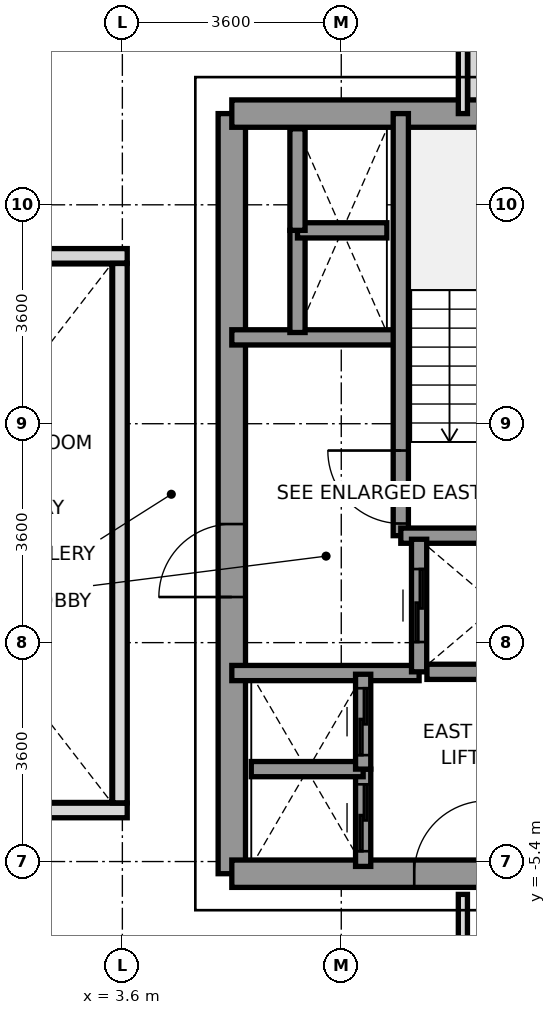
"""IFC4 building model, lengths in metres.
Left out: names, types, materials, properties, quantities, classifications, styles, units other than length and angle.
Written with IfcOpenShell. Run it as: python <this file> out.ifc"""

import sys

from ifc_helpers import new_model, si_unit, direction, frame, frame_2d, origin, place, context, subcontext, project, spatial, rectangle, extrude, source, transform, mapped, element, fill, save


model = new_model("IFC4")
c1 = context("Model", 3, precision=1e-05, world=origin(), true_north=direction((0.0, 1.0)))
c2 = subcontext(c1, "Body", "Model", "MODEL_VIEW")
j1 = project(units=[si_unit("LENGTHUNIT", "METRE"), si_unit("PLANEANGLEUNIT", "RADIAN")], contexts=[c1])
p1 = place(None, origin())
s1 = spatial("IfcSite", under=j1, at=p1, CompositionType="ELEMENT")
p2 = place(p1, origin())
s2 = spatial("IfcBuilding", under=s1, at=p2, CompositionType="ELEMENT")
p3 = place(p2, frame((0.0, 0.0, 110.8)))
s3 = spatial("IfcBuildingStorey", under=s2, at=p3, CompositionType="ELEMENT", Elevation=110.8)
p4 = place(p3, frame((9.4, 8.472, 0.0), z_axis=(0.0, 0.0, 1.0), x_axis=(0.0, -1.0, 0.0)))
e1 = element("IfcWall", 1, at=p4, inside=s3, PredefinedType="PARAPET", context=c2, shape_type="SweptSolid", body=[
    extrude(rectangle(XDim=1.519, YDim=0.24, at=frame_2d((0.76, 0.0))), origin(), (0.0, 0.0, 1.0), 1.15),
])
p5 = place(p3, frame((5.4, -5.6, 0.0), z_axis=(0.0, 0.0, 1.0), x_axis=(0.0, 1.0, 0.0)))
e2 = element("IfcWall", 2, at=p5, inside=s3, PredefinedType="SHEAR", context=c2, shape_type="SweptSolid", body=[
    extrude(rectangle(XDim=12.5, YDim=0.45, at=frame_2d((6.25, 0.0))), origin(), (0.0, 0.0, 1.0), 3.2),
])
p6 = place(p5, frame((4.55, 0.0, 0.0)))
e3 = element("IfcOpeningElement", 3, at=p6, cuts=e2, PredefinedType="OPENING", context=c2, shape_type="SweptSolid", body=[
    extrude(rectangle(XDim=1.2, YDim=2.2, at=frame_2d((0.6, 1.1))), frame((0.0, 0.235, 0.0), z_axis=(0.0, -1.0, 0.0), x_axis=(1.0, 0.0, 0.0)), (0.0, 0.0, 1.0), 0.47),
])
p7 = place(p3, frame((5.4, 6.9, 0.0), z_axis=(0.0, 0.0, 1.0), x_axis=(1.0, 0.0, 0.0)))
e4 = element("IfcWall", 4, at=p7, inside=s3, PredefinedType="SHEAR", context=c2, shape_type="SweptSolid", body=[
    extrude(rectangle(XDim=5.981, YDim=0.45, at=frame_2d((2.991, 0.0))), origin(), (0.0, 0.0, 1.0), 3.2),
])
p8 = place(p3, frame((5.4, -5.6, 0.0), z_axis=(0.0, 0.0, 1.0), x_axis=(1.0, 0.0, 0.0)))
e5 = element("IfcWall", 5, at=p8, inside=s3, PredefinedType="SHEAR", context=c2, shape_type="SweptSolid", body=[
    extrude(rectangle(XDim=7.8, YDim=0.45, at=frame_2d((3.9, 0.0))), origin(), (0.0, 0.0, 1.0), 3.2),
])
p9 = place(p8, frame((3.0, 0.0, 0.0)))
e6 = element("IfcOpeningElement", 6, at=p9, cuts=e5, PredefinedType="OPENING", context=c2, shape_type="SweptSolid", body=[
    extrude(rectangle(XDim=1.2, YDim=2.2, at=frame_2d((0.6, 1.1))), frame((0.0, 0.235, 0.0), z_axis=(0.0, -1.0, 0.0), x_axis=(1.0, 0.0, 0.0)), (0.0, 0.0, 1.0), 0.47),
])
p10 = place(p8, frame((5.85, 0.0, 0.0)))
e7 = element("IfcOpeningElement", 7, at=p10, cuts=e5, PredefinedType="OPENING", context=c2, shape_type="SweptSolid", body=[
    extrude(rectangle(XDim=0.8, YDim=2.1, at=frame_2d((0.4, 1.05))), frame((0.0, 0.235, 0.0), z_axis=(0.0, -1.0, 0.0), x_axis=(1.0, 0.0, 0.0)), (0.0, 0.0, 1.0), 0.47),
])
p11 = place(p3, frame((5.4, 3.22, 0.0), z_axis=(0.0, 0.0, 1.0), x_axis=(1.0, 0.0, 0.0)))
e8 = element("IfcWall", 8, at=p11, inside=s3, PredefinedType="SOLIDWALL", context=c2, shape_type="SweptSolid", body=[
    extrude(rectangle(XDim=2.78, YDim=0.25, at=frame_2d((1.39, 0.0))), origin(), (0.0, 0.0, 1.0), 3.2),
])
p12 = place(p3, frame((5.4, -2.3, 0.0), z_axis=(0.0, 0.0, 1.0), x_axis=(1.0, 0.0, 0.0)))
e9 = element("IfcWall", 9, at=p12, inside=s3, PredefinedType="SOLIDWALL", context=c2, shape_type="SweptSolid", body=[
    extrude(rectangle(XDim=3.08, YDim=0.25, at=frame_2d((1.54, 0.0))), origin(), (0.0, 0.0, 1.0), 3.2),
])
p13 = place(p3, frame((8.179, -0.041, 0.0), z_axis=(0.0, 0.0, 1.0), x_axis=(0.0, 1.0, 0.0)))
e10 = element("IfcWall", 10, at=p13, inside=s3, PredefinedType="SOLIDWALL", context=c2, shape_type="SweptSolid", body=[
    extrude(rectangle(XDim=6.941, YDim=0.25, at=frame_2d((3.47, 0.0))), origin(), (0.0, 0.0, 1.0), 3.2),
])
p14 = place(p13, frame((0.2, 0.0, 0.0)))
e11 = element("IfcOpeningElement", 11, at=p14, cuts=e10, PredefinedType="OPENING", context=c2, shape_type="SweptSolid", body=[
    extrude(rectangle(XDim=1.2, YDim=2.2, at=frame_2d((0.6, 1.1))), frame((0.0, 0.135, 0.0), z_axis=(0.0, -1.0, 0.0), x_axis=(1.0, 0.0, 0.0)), (0.0, 0.0, 1.0), 0.27),
])
p15 = place(p3, frame((8.179, -0.041, 0.0), z_axis=(0.0, 0.0, 1.0), x_axis=(1.0, 0.0, 0.0)))
e12 = element("IfcWall", 12, at=p15, inside=s3, PredefinedType="SOLIDWALL", context=c2, shape_type="SweptSolid", body=[
    extrude(rectangle(XDim=3.202, YDim=0.25, at=frame_2d((1.601, 0.0))), origin(), (0.0, 0.0, 1.0), 3.2),
])
p16 = place(p3, frame((8.48, -2.28, 0.0), z_axis=(0.0, 0.0, 1.0), x_axis=(0.0, 1.0, 0.0)))
e13 = element("IfcWall", 13, at=p16, inside=s3, PredefinedType="SOLIDWALL", context=c2, shape_type="SweptSolid", body=[
    extrude(rectangle(XDim=2.18, YDim=0.25, at=frame_2d((1.09, 0.0))), origin(), (0.0, 0.0, 1.0), 3.2),
])
p17 = place(p16, frame((0.49, 0.0, 0.0)))
e14 = element("IfcOpeningElement", 14, at=p17, cuts=e13, PredefinedType="OPENING", context=c2, shape_type="SweptSolid", body=[
    extrude(rectangle(XDim=1.2, YDim=2.2, at=frame_2d((0.6, 1.1))), frame((0.0, 0.135, 0.0), z_axis=(0.0, -1.0, 0.0), x_axis=(1.0, 0.0, 0.0)), (0.0, 0.0, 1.0), 0.27),
])
p18 = place(p3, frame((8.609, -2.28, 0.0), z_axis=(0.0, 0.0, 1.0), x_axis=(1.0, 0.0, 0.0)))
e15 = element("IfcWall", 15, at=p18, inside=s3, PredefinedType="SOLIDWALL", context=c2, shape_type="SweptSolid", body=[
    extrude(rectangle(XDim=2.312, YDim=0.25, at=frame_2d((1.156, 0.0))), origin(), (0.0, 0.0, 1.0), 3.2),
])
p19 = place(p3, frame((7.56, -5.48, 0.0), z_axis=(0.0, 0.0, 1.0), x_axis=(0.0, 1.0, 0.0)))
e16 = element("IfcWall", 16, at=p19, inside=s3, PredefinedType="SOLIDWALL", context=c2, shape_type="SweptSolid", body=[
    extrude(rectangle(XDim=1.6, YDim=0.25, at=frame_2d((0.8, 0.0))), origin(), (0.0, 0.0, 1.0), 3.2),
])
p20 = place(p19, frame((0.25, 0.0, 0.0)))
e17 = element("IfcOpeningElement", 17, at=p20, cuts=e16, PredefinedType="OPENING", context=c2, shape_type="SweptSolid", body=[
    extrude(rectangle(XDim=1.1, YDim=2.2, at=frame_2d((0.55, 1.1))), frame((0.0, 0.135, 0.0), z_axis=(0.0, -1.0, 0.0), x_axis=(1.0, 0.0, 0.0)), (0.0, 0.0, 1.0), 0.27),
])
p21 = place(p3, frame((5.72, -3.88, 0.0), z_axis=(0.0, 0.0, 1.0), x_axis=(1.0, 0.0, 0.0)))
e18 = element("IfcWall", 18, at=p21, inside=s3, PredefinedType="SOLIDWALL", context=c2, shape_type="SweptSolid", body=[
    extrude(rectangle(XDim=1.84, YDim=0.25, at=frame_2d((0.92, 0.0))), origin(), (0.0, 0.0, 1.0), 3.2),
])
p22 = place(p3, frame((7.56, -3.88, 0.0), z_axis=(0.0, 0.0, 1.0), x_axis=(0.0, 1.0, 0.0)))
e19 = element("IfcWall", 19, at=p22, inside=s3, PredefinedType="SOLIDWALL", context=c2, shape_type="SweptSolid", body=[
    extrude(rectangle(XDim=1.56, YDim=0.25, at=frame_2d((0.78, 0.0))), origin(), (0.0, 0.0, 1.0), 3.2),
])
p23 = place(p22, frame((0.23, 0.0, 0.0)))
e20 = element("IfcOpeningElement", 20, at=p23, cuts=e19, PredefinedType="OPENING", context=c2, shape_type="SweptSolid", body=[
    extrude(rectangle(XDim=1.1, YDim=2.2, at=frame_2d((0.55, 1.1))), frame((0.0, 0.135, 0.0), z_axis=(0.0, -1.0, 0.0), x_axis=(1.0, 0.0, 0.0)), (0.0, 0.0, 1.0), 0.27),
])
p24 = place(p3, frame((6.48, 3.3, 0.0), z_axis=(0.0, 0.0, 1.0), x_axis=(0.0, 1.0, 0.0)))
e21 = element("IfcWall", 21, at=p24, inside=s3, PredefinedType="SOLIDWALL", context=c2, shape_type="SweptSolid", body=[
    extrude(rectangle(XDim=1.68, YDim=0.25, at=frame_2d((0.84, 0.0))), origin(), (0.0, 0.0, 1.0), 3.2),
])
p25 = place(p3, frame((6.48, 4.98, 0.0), z_axis=(0.0, 0.0, 1.0), x_axis=(1.0, 0.0, 0.0)))
e22 = element("IfcWall", 22, at=p25, inside=s3, PredefinedType="SOLIDWALL", context=c2, shape_type="SweptSolid", body=[
    extrude(rectangle(XDim=1.47, YDim=0.25, at=frame_2d((0.735, 0.0))), origin(), (0.0, 0.0, 1.0), 3.2),
])
p26 = place(p3, frame((6.48, 4.98, 0.0), z_axis=(0.0, 0.0, 1.0), x_axis=(0.0, 1.0, 0.0)))
e23 = element("IfcWall", 23, at=p26, inside=s3, PredefinedType="SOLIDWALL", context=c2, shape_type="SweptSolid", body=[
    extrude(rectangle(XDim=1.67, YDim=0.25, at=frame_2d((0.835, 0.0))), origin(), (0.0, 0.0, 1.0), 3.2),
])
p27 = place(p3, frame((9.2, 6.9, 0.0), z_axis=(0.0, 0.0, 1.0), x_axis=(0.0, 1.0, 0.0)))
e24 = element("IfcWall", 24, at=p27, inside=s3, PredefinedType="PARTITIONING", context=c2, shape_type="SweptSolid", body=[
    extrude(rectangle(XDim=8.78, YDim=0.15, at=frame_2d((4.39, 0.0))), origin(), (0.0, 0.0, 1.0), 2.7),
])
p28 = place(p3, frame((9.2, -15.68, 0.0), z_axis=(0.0, 0.0, 1.0), x_axis=(0.0, 1.0, 0.0)))
e25 = element("IfcWall", 25, at=p28, inside=s3, PredefinedType="PARTITIONING", context=c2, shape_type="SweptSolid", body=[
    extrude(rectangle(XDim=9.74, YDim=0.15, at=frame_2d((4.87, 0.0))), origin(), (0.0, 0.0, 1.0), 2.7),
])
for number, where, z_axis, x_axis in (
    (26, (-3.68, -4.56, 0.0), (0.0, 0.0, 1.0), (1.0, 0.0, 0.0)),
    (27, (-3.68, 4.56, 0.0), (0.0, 0.0, 1.0), (1.0, 0.0, 0.0)),
):
    element("IfcWall", number, at=place(p3, frame(where, z_axis=z_axis, x_axis=x_axis)), inside=s3, PredefinedType="PARAPET", context=c2, shape_type="SweptSolid", body=[
        extrude(rectangle(XDim=7.36, YDim=0.24, at=frame_2d((3.68, 0.0))), origin(), (0.0, 0.0, 1.0), 1.15),
    ])
p29 = place(p3, frame((3.56, -4.435, 0.0), z_axis=(0.0, 0.0, 1.0), x_axis=(0.0, 1.0, 0.0)))
e28 = element("IfcWall", 28, at=p29, inside=s3, PredefinedType="PARAPET", context=c2, shape_type="SweptSolid", body=[
    extrude(rectangle(XDim=8.87, YDim=0.24, at=frame_2d((4.435, 0.0))), origin(), (0.0, 0.0, 1.0), 1.15),
])
m1 = source(origin(), c2, "Body", "SweptSolid", [
    extrude(rectangle(XDim=1.2, YDim=2.2, at=frame_2d((0.6, 1.1))), frame((0.0, 0.025, 0.0), z_axis=(0.0, -1.0, 0.0), x_axis=(1.0, 0.0, 0.0)), (0.0, 0.0, 1.0), 0.05),
])
p30 = place(p14, origin())
e29 = element("IfcDoor", 29, at=p30, inside=s3, OperationType="SINGLE_SWING_RIGHT", PredefinedType="DOOR", context=c2, shape_type="MappedRepresentation", body=[
    mapped(m1, transform((0.0, 0.0, 0.0), x_axis=(1.0, 0.0, 0.0), y_axis=(0.0, 1.0, 0.0), z_axis=(0.0, 0.0, 1.0), scale=1.0)),
])
fill(e11, e29)
p31 = place(p6, origin())
e30 = element("IfcDoor", 30, at=p31, inside=s3, OperationType="SINGLE_SWING_LEFT", PredefinedType="DOOR", context=c2, shape_type="MappedRepresentation", body=[
    mapped(m1, transform((0.0, 0.0, 0.0), x_axis=(1.0, 0.0, 0.0), y_axis=(0.0, 1.0, 0.0), z_axis=(0.0, 0.0, 1.0), scale=1.0)),
])
fill(e3, e30)
p32 = place(p9, origin())
e31 = element("IfcDoor", 31, at=p32, inside=s3, OperationType="SINGLE_SWING_RIGHT", PredefinedType="DOOR", context=c2, shape_type="MappedRepresentation", body=[
    mapped(m1, transform((0.0, 0.0, 0.0), x_axis=(1.0, 0.0, 0.0), y_axis=(0.0, 1.0, 0.0), z_axis=(0.0, 0.0, 1.0), scale=1.0)),
])
fill(e6, e31)
p33 = place(p17, origin())
e32 = element("IfcDoor", 32, at=p33, inside=s3, OperationType="SLIDING_TO_RIGHT", PredefinedType="DOOR", context=c2, shape_type="MappedRepresentation", body=[
    mapped(m1, transform((0.0, 0.0, 0.0), x_axis=(1.0, 0.0, 0.0), y_axis=(0.0, 1.0, 0.0), z_axis=(0.0, 0.0, 1.0), scale=1.0)),
])
fill(e14, e32)
m2 = source(origin(), c2, "Body", "SweptSolid", [
    extrude(rectangle(XDim=1.1, YDim=2.2, at=frame_2d((0.55, 1.1))), frame((0.0, 0.025, 0.0), z_axis=(0.0, -1.0, 0.0), x_axis=(1.0, 0.0, 0.0)), (0.0, 0.0, 1.0), 0.05),
])
p34 = place(p20, origin())
e33 = element("IfcDoor", 33, at=p34, inside=s3, OperationType="SLIDING_TO_LEFT", PredefinedType="DOOR", context=c2, shape_type="MappedRepresentation", body=[
    mapped(m2, transform((0.0, 0.0, 0.0), x_axis=(1.0, 0.0, 0.0), y_axis=(0.0, 1.0, 0.0), z_axis=(0.0, 0.0, 1.0), scale=1.0)),
])
fill(e17, e33)
p35 = place(p23, origin())
e34 = element("IfcDoor", 34, at=p35, inside=s3, OperationType="SLIDING_TO_LEFT", PredefinedType="DOOR", context=c2, shape_type="MappedRepresentation", body=[
    mapped(m2, transform((0.0, 0.0, 0.0), x_axis=(1.0, 0.0, 0.0), y_axis=(0.0, 1.0, 0.0), z_axis=(0.0, 0.0, 1.0), scale=1.0)),
])
fill(e20, e34)
save(model, sys.argv[1])
